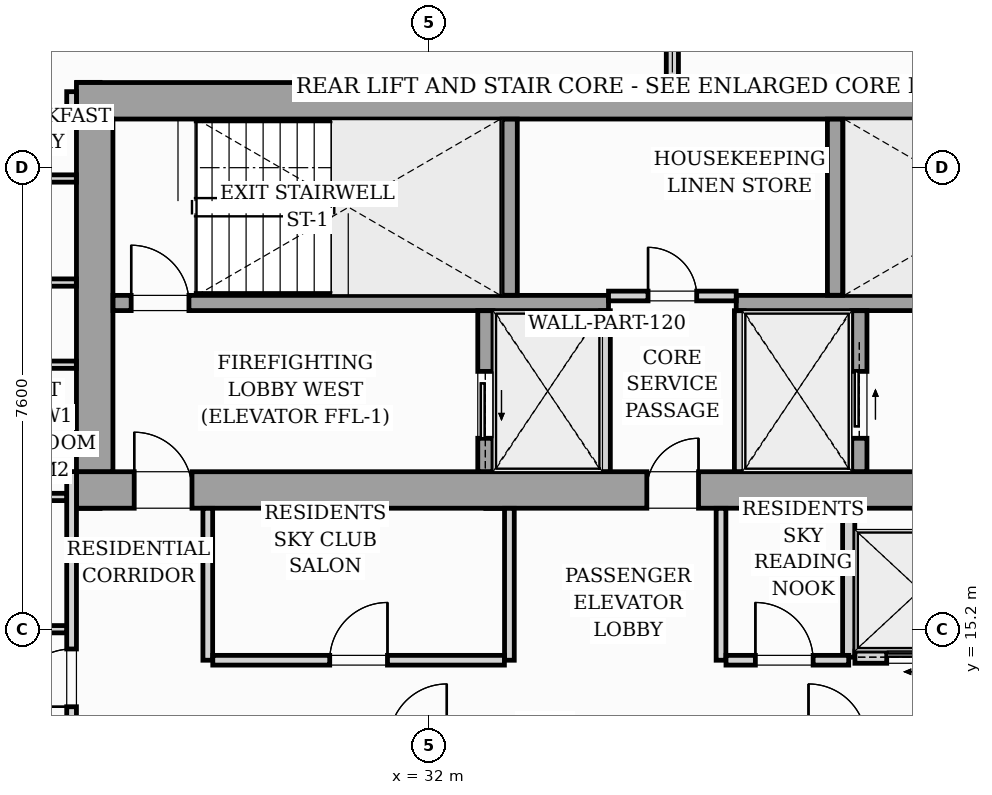
"""IFC4 building model, lengths in metres.
Left out: names, types, materials, properties, quantities, classifications, styles, units other than length and angle.
Written with IfcOpenShell. Run it as: python <this file> out.ifc"""

import sys

from ifc_helpers import new_model, si_unit, direction, frame, frame_2d, origin, origin_2d, place, context, subcontext, project, spatial, rectangle, i_section, extrude, source, transform, mapped, element, fill, save


model = new_model("IFC4")
c1 = context("Model", 3, precision=1e-05, world=origin(), true_north=direction((0.0, 1.0)))
c2 = subcontext(c1, "Body", "Model", "MODEL_VIEW")
j1 = project(units=[si_unit("LENGTHUNIT", "METRE"), si_unit("PLANEANGLEUNIT", "RADIAN")], contexts=[c1])
p1 = place(None, origin())
s1 = spatial("IfcSite", under=j1, at=p1, CompositionType="ELEMENT")
p2 = place(p1, origin())
s2 = spatial("IfcBuilding", under=s1, at=p2, CompositionType="ELEMENT")
p3 = place(p2, frame((0.0, 0.0, 201.8)))
s3 = spatial("IfcBuildingStorey", under=s2, at=p3, CompositionType="ELEMENT", Elevation=201.8)
m1 = source(origin(), c2, "Body", "SweptSolid", [
    extrude(i_section(OverallWidth=0.416, OverallDepth=0.446, WebThickness=0.039, FlangeThickness=0.063, FilletRadius=0.018, at=origin_2d()), origin(), (0.0, 0.0, 1.0), 3.196),
])
for number, where, z_axis, x_axis in (
    (1, (26.4, 17.4, 0.002), (0.0, 0.0, 1.0), (1.0, 0.0, 0.0)),
    (2, (33.12, 17.4, 0.002), (0.0, 0.0, 1.0), (1.0, 0.0, 0.0)),
    (3, (38.88, 17.4, 0.002), (0.0, 0.0, 1.0), (1.0, 0.0, 0.0)),
    (4, (26.4, 24.0, 0.002), (0.0, 0.0, 1.0), (1.0, 0.0, 0.0)),
    (5, (33.12, 24.0, 0.002), (0.0, 0.0, 1.0), (1.0, 0.0, 0.0)),
    (6, (38.88, 24.0, 0.002), (0.0, 0.0, 1.0), (1.0, 0.0, 0.0)),
):
    element("IfcColumn", number, at=place(p3, frame(where, z_axis=z_axis, x_axis=x_axis)), inside=s3, PredefinedType="PILASTER", context=c2, shape_type="MappedRepresentation", body=[
        mapped(m1, transform((0.0, 0.0, 0.0), scale=1.0)),
    ])
p4 = place(p3, frame((15.437, 24.324, 0.0), z_axis=(0.0, 0.0, 1.0), x_axis=(0.995395627913, 0.095851676732, 0.0)))
e7 = element("IfcWall", 7, at=p4, inside=s3, PredefinedType="STANDARD", context=c2, shape_type="SweptSolid", body=[
    extrude(rectangle(XDim=16.1, YDim=0.26, at=frame_2d((8.05, 0.0))), origin(), (0.0, 0.0, 1.0), 2.94),
])
p5 = place(p4, frame((6.09, 0.0, 0.0)))
e8 = element("IfcOpeningElement", 8, at=p5, cuts=e7, PredefinedType="OPENING", context=c2, shape_type="SweptSolid", body=[
    extrude(rectangle(XDim=1.8, YDim=2.06, at=frame_2d((0.9, 1.03))), frame((0.0, 0.14, 0.0), z_axis=(0.0, -1.0, 0.0), x_axis=(1.0, 0.0, 0.0)), (0.0, 0.0, 1.0), 0.28),
])
p6 = place(p4, frame((2.05, 0.0, 0.65)))
e9 = element("IfcOpeningElement", 9, at=p6, cuts=e7, PredefinedType="OPENING", context=c2, shape_type="SweptSolid", body=[
    extrude(rectangle(XDim=1.6, YDim=1.5, at=frame_2d((0.8, 0.75))), frame((0.0, 0.14, 0.0), z_axis=(0.0, -1.0, 0.0), x_axis=(1.0, 0.0, 0.0)), (0.0, 0.0, 1.0), 0.28),
])
p7 = place(p3, frame((26.2, 17.5, 0.0), z_axis=(0.0, 0.0, 1.0), x_axis=(1.0, 0.0, 0.0)))
e10 = element("IfcWall", 10, at=p7, inside=s3, PredefinedType="SHEAR", context=c2, shape_type="SweptSolid", body=[
    extrude(rectangle(XDim=19.6, YDim=0.6, at=frame_2d((9.8, 0.0))), origin(), (0.0, 0.0, 1.0), 3.2),
])
p8 = place(p7, frame((0.95, 0.0, 0.0)))
e11 = element("IfcOpeningElement", 11, at=p8, cuts=e10, PredefinedType="OPENING", context=c2, shape_type="SweptSolid", body=[
    extrude(rectangle(XDim=0.95, YDim=2.06, at=frame_2d((0.475, 1.03))), frame((0.0, 0.31, 0.0), z_axis=(0.0, -1.0, 0.0), x_axis=(1.0, 0.0, 0.0)), (0.0, 0.0, 1.0), 0.62),
])
p9 = place(p7, frame((9.38, 0.0, 0.0)))
e12 = element("IfcOpeningElement", 12, at=p9, cuts=e10, PredefinedType="OPENING", context=c2, shape_type="SweptSolid", body=[
    extrude(rectangle(XDim=0.85, YDim=2.0, at=frame_2d((0.425, 1.0))), frame((0.0, 0.31, 0.0), z_axis=(0.0, -1.0, 0.0), x_axis=(1.0, 0.0, 0.0)), (0.0, 0.0, 1.0), 0.62),
])
p10 = place(p7, frame((17.55, 0.0, 0.0)))
e13 = element("IfcOpeningElement", 13, at=p10, cuts=e10, PredefinedType="OPENING", context=c2, shape_type="SweptSolid", body=[
    extrude(rectangle(XDim=0.95, YDim=2.06, at=frame_2d((0.475, 1.03))), frame((0.0, 0.31, 0.0), z_axis=(0.0, -1.0, 0.0), x_axis=(1.0, 0.0, 0.0)), (0.0, 0.0, 1.0), 0.62),
])
p11 = place(p3, frame((26.2, 23.9, 0.0), z_axis=(0.0, 0.0, 1.0), x_axis=(1.0, 0.0, 0.0)))
e14 = element("IfcWall", 14, at=p11, inside=s3, PredefinedType="SHEAR", context=c2, shape_type="SweptSolid", body=[
    extrude(rectangle(XDim=19.6, YDim=0.6, at=frame_2d((9.8, 0.0))), origin(), (0.0, 0.0, 1.0), 3.2),
])
p12 = place(p3, frame((26.5, 17.802, 0.0), z_axis=(0.0, 0.0, 1.0), x_axis=(0.0, 1.0, 0.0)))
e15 = element("IfcWall", 15, at=p12, inside=s3, PredefinedType="SHEAR", context=c2, shape_type="SweptSolid", body=[
    extrude(rectangle(XDim=5.796, YDim=0.6, at=frame_2d((2.898, 0.0))), origin(), (0.0, 0.0, 1.0), 3.2),
])
p13 = place(p3, frame((26.802, 20.575, 0.0), z_axis=(0.0, 0.0, 1.0), x_axis=(1.0, 0.0, 0.0)))
e16 = element("IfcWall", 16, at=p13, inside=s3, PredefinedType="SOLIDWALL", context=c2, shape_type="SweptSolid", body=[
    extrude(rectangle(XDim=8.148, YDim=0.25, at=frame_2d((4.074, 0.0))), origin(), (0.0, 0.0, 1.0), 3.2),
])
p14 = place(p13, frame((0.298, 0.0, 0.0)))
e17 = element("IfcOpeningElement", 17, at=p14, cuts=e16, PredefinedType="OPENING", context=c2, shape_type="SweptSolid", body=[
    extrude(rectangle(XDim=0.95, YDim=2.06, at=frame_2d((0.475, 1.03))), frame((0.0, 0.135, 0.0), z_axis=(0.0, -1.0, 0.0), x_axis=(1.0, 0.0, 0.0)), (0.0, 0.0, 1.0), 0.27),
])
p15 = place(p3, frame((37.05, 20.575, 0.0), z_axis=(0.0, 0.0, 1.0), x_axis=(1.0, 0.0, 0.0)))
e18 = element("IfcWall", 18, at=p15, inside=s3, PredefinedType="SOLIDWALL", context=c2, shape_type="SweptSolid", body=[
    extrude(rectangle(XDim=8.148, YDim=0.25, at=frame_2d((4.074, 0.0))), origin(), (0.0, 0.0, 1.0), 3.2),
])
p16 = place(p15, frame((6.6, 0.0, 0.0)))
e19 = element("IfcOpeningElement", 19, at=p16, cuts=e18, PredefinedType="OPENING", context=c2, shape_type="SweptSolid", body=[
    extrude(rectangle(XDim=0.95, YDim=2.06, at=frame_2d((0.475, 1.03))), frame((0.0, 0.135, 0.0), z_axis=(0.0, -1.0, 0.0), x_axis=(1.0, 0.0, 0.0)), (0.0, 0.0, 1.0), 0.27),
])
for number, where, z_axis, x_axis in (
    (20, (33.325, 20.702, 0.0), (0.0, 0.0, 1.0), (0.0, 1.0, 0.0)),
    (21, (38.675, 20.702, 0.0), (0.0, 0.0, 1.0), (0.0, 1.0, 0.0)),
):
    element("IfcWall", number, at=place(p3, frame(where, z_axis=z_axis, x_axis=x_axis)), inside=s3, PredefinedType="SOLIDWALL", context=c2, shape_type="SweptSolid", body=[
        extrude(rectangle(XDim=2.896, YDim=0.25, at=frame_2d((1.448, 0.0))), origin(), (0.0, 0.0, 1.0), 3.2),
    ])
p17 = place(p3, frame((32.925, 17.802, 0.0), z_axis=(0.0, 0.0, 1.0), x_axis=(0.0, 1.0, 0.0)))
e22 = element("IfcWall", 22, at=p17, inside=s3, PredefinedType="SOLIDWALL", context=c2, shape_type="SweptSolid", body=[
    extrude(rectangle(XDim=2.646, YDim=0.25, at=frame_2d((1.323, 0.0))), origin(), (0.0, 0.0, 1.0), 3.2),
])
p18 = place(p17, frame((0.548, 0.0, 0.0)))
e23 = element("IfcOpeningElement", 23, at=p18, cuts=e22, PredefinedType="OPENING", context=c2, shape_type="SweptSolid", body=[
    extrude(rectangle(XDim=1.1, YDim=2.08, at=frame_2d((0.55, 1.04))), frame((0.0, 0.135, 0.0), z_axis=(0.0, -1.0, 0.0), x_axis=(1.0, 0.0, 0.0)), (0.0, 0.0, 1.0), 0.27),
])
for number, where, z_axis, x_axis in (
    (24, (34.9, 17.802, 0.0), (0.0, 0.0, 1.0), (0.0, 1.0, 0.0)),
    (25, (37.1, 17.802, 0.0), (0.0, 0.0, 1.0), (0.0, 1.0, 0.0)),
):
    element("IfcWall", number, at=place(p3, frame(where, z_axis=z_axis, x_axis=x_axis)), inside=s3, PredefinedType="PARTITIONING", context=c2, shape_type="SweptSolid", body=[
        extrude(rectangle(XDim=2.646, YDim=0.16, at=frame_2d((1.323, 0.0))), origin(), (0.0, 0.0, 1.0), 2.94),
    ])
p19 = place(p3, frame((39.075, 17.802, 0.0), z_axis=(0.0, 0.0, 1.0), x_axis=(0.0, 1.0, 0.0)))
e26 = element("IfcWall", 26, at=p19, inside=s3, PredefinedType="SOLIDWALL", context=c2, shape_type="SweptSolid", body=[
    extrude(rectangle(XDim=2.646, YDim=0.25, at=frame_2d((1.323, 0.0))), origin(), (0.0, 0.0, 1.0), 3.2),
])
p20 = place(p19, frame((0.548, 0.0, 0.0)))
e27 = element("IfcOpeningElement", 27, at=p20, cuts=e26, PredefinedType="OPENING", context=c2, shape_type="SweptSolid", body=[
    extrude(rectangle(XDim=1.1, YDim=2.08, at=frame_2d((0.55, 1.04))), frame((0.0, 0.135, 0.0), z_axis=(0.0, -1.0, 0.0), x_axis=(1.0, 0.0, 0.0)), (0.0, 0.0, 1.0), 0.27),
])
p21 = place(p3, frame((34.95, 20.69, 0.0), z_axis=(0.0, 0.0, 1.0), x_axis=(1.0, 0.0, 0.0)))
e28 = element("IfcWall", 28, at=p21, inside=s3, PredefinedType="PARTITIONING", context=c2, shape_type="SweptSolid", body=[
    extrude(rectangle(XDim=2.1, YDim=0.16, at=frame_2d((1.05, 0.0))), origin(), (0.0, 0.0, 1.0), 2.94),
])
p22 = place(p21, frame((0.65, 0.0, 0.0)))
e29 = element("IfcOpeningElement", 29, at=p22, cuts=e28, PredefinedType="OPENING", context=c2, shape_type="SweptSolid", body=[
    extrude(rectangle(XDim=0.8, YDim=2.05, at=frame_2d((0.4, 1.025))), frame((0.0, 0.09, 0.0), z_axis=(0.0, -1.0, 0.0), x_axis=(1.0, 0.0, 0.0)), (0.0, 0.0, 1.0), 0.18),
])
p23 = place(p3, frame((38.9, 14.75, 0.0), z_axis=(0.0, 0.0, 1.0), x_axis=(0.0, 1.0, 0.0)))
e30 = element("IfcWall", 30, at=p23, inside=s3, PredefinedType="PARTITIONING", context=c2, shape_type="SweptSolid", body=[
    extrude(rectangle(XDim=2.35, YDim=0.2, at=frame_2d((1.175, 0.0))), origin(), (0.0, 0.0, 1.0), 2.94),
])
p24 = place(p3, frame((39.002, 14.75, 0.0), z_axis=(0.0, 0.0, 1.0), x_axis=(1.0, 0.0, 0.0)))
e31 = element("IfcWall", 31, at=p24, inside=s3, PredefinedType="PARTITIONING", context=c2, shape_type="SweptSolid", body=[
    extrude(rectangle(XDim=2.146, YDim=0.2, at=frame_2d((1.073, 0.0))), origin(), (0.0, 0.0, 1.0), 2.94),
])
p25 = place(p24, frame((0.523, 0.0, 0.0)))
e32 = element("IfcOpeningElement", 32, at=p25, cuts=e31, PredefinedType="OPENING", context=c2, shape_type="SweptSolid", body=[
    extrude(rectangle(XDim=1.05, YDim=2.08, at=frame_2d((0.525, 1.04))), frame((0.0, 0.11, 0.0), z_axis=(0.0, -1.0, 0.0), x_axis=(1.0, 0.0, 0.0)), (0.0, 0.0, 1.0), 0.22),
])
p26 = place(p3, frame((26.12, 13.442, 0.0), z_axis=(0.0, 0.0, 1.0), x_axis=(0.0, 1.0, 0.0)))
e33 = element("IfcWall", 33, at=p26, inside=s3, PredefinedType="PARTITIONING", context=c2, shape_type="SweptSolid", body=[
    extrude(rectangle(XDim=4.36, YDim=0.16, at=frame_2d((2.18, 0.0))), origin(), (0.0, 0.0, 1.0), 2.94),
])
p27 = place(p26, frame((0.493, 0.0, 0.0)))
e34 = element("IfcOpeningElement", 34, at=p27, cuts=e33, PredefinedType="OPENING", context=c2, shape_type="SweptSolid", body=[
    extrude(rectangle(XDim=0.95, YDim=2.06, at=frame_2d((0.475, 1.03))), frame((0.0, 0.09, 0.0), z_axis=(0.0, -1.0, 0.0), x_axis=(1.0, 0.0, 0.0)), (0.0, 0.0, 1.0), 0.18),
])
p28 = place(p3, frame((26.12, 23.598, 0.0), z_axis=(0.0, 0.0, 1.0), x_axis=(0.0, 1.0, 0.0)))
e35 = element("IfcWall", 35, at=p28, inside=s3, PredefinedType="PARTITIONING", context=c2, shape_type="SweptSolid", body=[
    extrude(rectangle(XDim=0.452, YDim=0.16, at=frame_2d((0.226, 0.0))), origin(), (0.0, 0.0, 1.0), 2.94),
])
p29 = place(p3, frame((36.0, 24.202, 0.0), z_axis=(0.0, 0.0, 1.0), x_axis=(0.0, 1.0, 0.0)))
e36 = element("IfcWall", 36, at=p29, inside=s3, PredefinedType="PARTITIONING", context=c2, shape_type="SweptSolid", body=[
    extrude(rectangle(XDim=2.152, YDim=0.2, at=frame_2d((1.076, 0.0))), origin(), (0.0, 0.0, 1.0), 2.94),
])
p30 = place(p3, frame((23.782, 17.385, 0.0), z_axis=(0.0, 0.0, 1.0), x_axis=(1.0, 0.0, 0.0)))
e37 = element("IfcWall", 37, at=p30, inside=s3, PredefinedType="PARTITIONING", context=c2, shape_type="SweptSolid", body=[
    extrude(rectangle(XDim=2.256, YDim=0.12, at=frame_2d((1.128, 0.0))), origin(), (0.0, 0.0, 1.0), 2.281),
])
p31 = place(p3, frame((23.782, 15.21, 0.0), z_axis=(0.0, 0.0, 1.0), x_axis=(1.0, 0.0, 0.0)))
e38 = element("IfcWall", 38, at=p31, inside=s3, PredefinedType="PARTITIONING", context=c2, shape_type="SweptSolid", body=[
    extrude(rectangle(XDim=2.256, YDim=0.12, at=frame_2d((1.128, 0.0))), origin(), (0.0, 0.0, 1.0), 2.94),
])
p32 = place(p3, frame((23.782, 19.56, 0.0), z_axis=(0.0, 0.0, 1.0), x_axis=(1.0, 0.0, 0.0)))
e39 = element("IfcWall", 39, at=p32, inside=s3, PredefinedType="PARTITIONING", context=c2, shape_type="SweptSolid", body=[
    extrude(rectangle(XDim=2.416, YDim=0.12, at=frame_2d((1.208, 0.0))), origin(), (0.0, 0.0, 1.0), 2.94),
])
p33 = place(p3, frame((14.608, 22.622, 0.0), z_axis=(0.0, 0.0, 1.0), x_axis=(1.0, 0.0, 0.0)))
e40 = element("IfcWall", 40, at=p33, inside=s3, PredefinedType="PARTITIONING", context=c2, shape_type="SweptSolid", body=[
    extrude(rectangle(XDim=11.59, YDim=0.12, at=frame_2d((5.795, 0.0))), origin(), (0.0, 0.0, 1.0), 2.94),
])
p34 = place(p33, frame((5.27, 0.0, 0.0)))
e41 = element("IfcOpeningElement", 41, at=p34, cuts=e40, PredefinedType="OPENING", context=c2, shape_type="SweptSolid", body=[
    extrude(rectangle(XDim=0.85, YDim=2.05, at=frame_2d((0.425, 1.025))), frame((0.0, 0.07, 0.0), z_axis=(0.0, -1.0, 0.0), x_axis=(1.0, 0.0, 0.0)), (0.0, 0.0, 1.0), 0.14),
])
p35 = place(p3, frame((13.334, 20.911, 0.0), z_axis=(0.0, 0.0, 1.0), x_axis=(1.0, 0.0, 0.0)))
e42 = element("IfcWall", 42, at=p35, inside=s3, PredefinedType="PARTITIONING", context=c2, shape_type="SweptSolid", body=[
    extrude(rectangle(XDim=12.864, YDim=0.12, at=frame_2d((6.432, 0.0))), origin(), (0.0, 0.0, 1.0), 2.94),
])
p36 = place(p35, frame((5.881, 0.0, 0.0)))
e43 = element("IfcOpeningElement", 43, at=p36, cuts=e42, PredefinedType="OPENING", context=c2, shape_type="SweptSolid", body=[
    extrude(rectangle(XDim=0.85, YDim=2.05, at=frame_2d((0.425, 1.025))), frame((0.0, 0.07, 0.0), z_axis=(0.0, -1.0, 0.0), x_axis=(1.0, 0.0, 0.0)), (0.0, 0.0, 1.0), 0.14),
])
for number, where, z_axis, x_axis in (
    (44, (28.36, 14.7, 0.0), (0.0, 0.0, 1.0), (0.0, 1.0, 0.0)),
    (45, (33.32, 14.7, 0.0), (0.0, 0.0, 1.0), (0.0, 1.0, 0.0)),
):
    element("IfcWall", number, at=place(p3, frame(where, z_axis=z_axis, x_axis=x_axis)), inside=s3, PredefinedType="PARTITIONING", context=c2, shape_type="SweptSolid", body=[
        extrude(rectangle(XDim=2.498, YDim=0.16, at=frame_2d((1.249, 0.0))), origin(), (0.0, 0.0, 1.0), 2.94),
    ])
p37 = place(p3, frame((28.442, 14.7, 0.0), z_axis=(0.0, 0.0, 1.0), x_axis=(1.0, 0.0, 0.0)))
e46 = element("IfcWall", 46, at=p37, inside=s3, PredefinedType="PARTITIONING", context=c2, shape_type="SweptSolid", body=[
    extrude(rectangle(XDim=4.796, YDim=0.16, at=frame_2d((2.398, 0.0))), origin(), (0.0, 0.0, 1.0), 2.94),
])
p38 = place(p37, frame((1.923, 0.0, 0.0)))
e47 = element("IfcOpeningElement", 47, at=p38, cuts=e46, PredefinedType="OPENING", context=c2, shape_type="SweptSolid", body=[
    extrude(rectangle(XDim=0.95, YDim=2.06, at=frame_2d((0.475, 1.03))), frame((0.0, 0.09, 0.0), z_axis=(0.0, -1.0, 0.0), x_axis=(1.0, 0.0, 0.0)), (0.0, 0.0, 1.0), 0.18),
])
p39 = place(p3, frame((36.8, 14.7, 0.0), z_axis=(0.0, 0.0, 1.0), x_axis=(0.0, 1.0, 0.0)))
e48 = element("IfcWall", 48, at=p39, inside=s3, PredefinedType="PARTITIONING", context=c2, shape_type="SweptSolid", body=[
    extrude(rectangle(XDim=2.498, YDim=0.16, at=frame_2d((1.249, 0.0))), origin(), (0.0, 0.0, 1.0), 2.94),
])
p40 = place(p3, frame((36.882, 14.7, 0.0), z_axis=(0.0, 0.0, 1.0), x_axis=(1.0, 0.0, 0.0)))
e49 = element("IfcWall", 49, at=p40, inside=s3, PredefinedType="PARTITIONING", context=c2, shape_type="SweptSolid", body=[
    extrude(rectangle(XDim=2.018, YDim=0.16, at=frame_2d((1.009, 0.0))), origin(), (0.0, 0.0, 1.0), 2.94),
])
p41 = place(p40, frame((0.483, 0.0, 0.0)))
e50 = element("IfcOpeningElement", 50, at=p41, cuts=e49, PredefinedType="OPENING", context=c2, shape_type="SweptSolid", body=[
    extrude(rectangle(XDim=0.95, YDim=2.06, at=frame_2d((0.475, 1.03))), frame((0.0, 0.09, 0.0), z_axis=(0.0, -1.0, 0.0), x_axis=(1.0, 0.0, 0.0)), (0.0, 0.0, 1.0), 0.18),
])
m2 = source(origin(), c2, "Body", "SweptSolid", [
    extrude(rectangle(XDim=0.95, YDim=2.06, at=frame_2d((0.475, 1.03))), frame((0.0, 0.025, 0.0), z_axis=(0.0, -1.0, 0.0), x_axis=(1.0, 0.0, 0.0)), (0.0, 0.0, 1.0), 0.05),
])
p42 = place(p8, origin())
e51 = element("IfcDoor", 51, at=p42, inside=s3, OperationType="SINGLE_SWING_LEFT", PredefinedType="DOOR", context=c2, shape_type="MappedRepresentation", body=[
    mapped(m2, transform((0.0, 0.0, 0.0), scale=1.0)),
])
fill(e11, e51)
m3 = source(origin(), c2, "Body", "SweptSolid", [
    extrude(rectangle(XDim=0.85, YDim=2.0, at=frame_2d((0.425, 1.0))), frame((0.0, 0.025, 0.0), z_axis=(0.0, -1.0, 0.0), x_axis=(1.0, 0.0, 0.0)), (0.0, 0.0, 1.0), 0.05),
])
p43 = place(p9, origin())
e52 = element("IfcDoor", 52, at=p43, inside=s3, OperationType="SINGLE_SWING_RIGHT", PredefinedType="DOOR", context=c2, shape_type="MappedRepresentation", body=[
    mapped(m3, transform((0.0, 0.0, 0.0), scale=1.0)),
])
fill(e12, e52)
p44 = place(p14, origin())
e53 = element("IfcDoor", 53, at=p44, inside=s3, OperationType="SINGLE_SWING_LEFT", PredefinedType="DOOR", context=c2, shape_type="MappedRepresentation", body=[
    mapped(m2, transform((0.0, 0.0, 0.0), scale=1.0)),
])
fill(e17, e53)
m4 = source(origin(), c2, "Body", "SweptSolid", [
    extrude(rectangle(XDim=1.1, YDim=2.08, at=frame_2d((0.55, 1.04))), frame((0.0, 0.025, 0.0), z_axis=(0.0, -1.0, 0.0), x_axis=(1.0, 0.0, 0.0)), (0.0, 0.0, 1.0), 0.05),
])
p45 = place(p18, origin())
e54 = element("IfcDoor", 54, at=p45, inside=s3, OperationType="SLIDING_TO_LEFT", PredefinedType="DOOR", context=c2, shape_type="MappedRepresentation", body=[
    mapped(m4, transform((0.0, 0.0, 0.0), scale=1.0)),
])
fill(e23, e54)
p46 = place(p20, origin())
e55 = element("IfcDoor", 55, at=p46, inside=s3, OperationType="SLIDING_TO_RIGHT", PredefinedType="DOOR", context=c2, shape_type="MappedRepresentation", body=[
    mapped(m4, transform((0.0, 0.0, 0.0), scale=1.0)),
])
fill(e27, e55)
m5 = source(origin(), c2, "Body", "SweptSolid", [
    extrude(rectangle(XDim=0.8, YDim=2.05, at=frame_2d((0.4, 1.025))), frame((0.0, 0.025, 0.0), z_axis=(0.0, -1.0, 0.0), x_axis=(1.0, 0.0, 0.0)), (0.0, 0.0, 1.0), 0.05),
])
p47 = place(p22, origin())
e56 = element("IfcDoor", 56, at=p47, inside=s3, OperationType="SINGLE_SWING_LEFT", PredefinedType="DOOR", context=c2, shape_type="MappedRepresentation", body=[
    mapped(m5, transform((0.0, 0.0, 0.0), scale=1.0)),
])
fill(e29, e56)
m6 = source(origin(), c2, "Body", "SweptSolid", [
    extrude(rectangle(XDim=1.05, YDim=2.08, at=frame_2d((0.525, 1.04))), frame((0.0, 0.025, 0.0), z_axis=(0.0, -1.0, 0.0), x_axis=(1.0, 0.0, 0.0)), (0.0, 0.0, 1.0), 0.05),
])
p48 = place(p25, origin())
e57 = element("IfcDoor", 57, at=p48, inside=s3, OperationType="SLIDING_TO_LEFT", PredefinedType="DOOR", context=c2, shape_type="MappedRepresentation", body=[
    mapped(m6, transform((0.0, 0.0, 0.0), scale=1.0)),
])
fill(e32, e57)
m7 = source(origin(), c2, "Body", "SweptSolid", [
    extrude(rectangle(XDim=0.95, YDim=2.06, at=frame_2d((0.475, 1.03))), frame((0.0, 0.025, 0.0), z_axis=(0.0, -1.0, 0.0), x_axis=(1.0, 0.0, 0.0)), (0.0, 0.0, 1.0), 0.05),
])
p49 = place(p27, origin())
e58 = element("IfcDoor", 58, at=p49, inside=s3, OperationType="SINGLE_SWING_LEFT", PredefinedType="DOOR", context=c2, shape_type="MappedRepresentation", body=[
    mapped(m7, transform((0.0, 0.0, 0.0), scale=1.0)),
])
fill(e34, e58)
p50 = place(p38, origin())
e59 = element("IfcDoor", 59, at=p50, inside=s3, OperationType="SINGLE_SWING_RIGHT", PredefinedType="DOOR", context=c2, shape_type="MappedRepresentation", body=[
    mapped(m7, transform((0.0, 0.0, 0.0), scale=1.0)),
])
fill(e47, e59)
p51 = place(p41, origin())
e60 = element("IfcDoor", 60, at=p51, inside=s3, OperationType="SINGLE_SWING_LEFT", PredefinedType="DOOR", context=c2, shape_type="MappedRepresentation", body=[
    mapped(m7, transform((0.0, 0.0, 0.0), scale=1.0)),
])
fill(e50, e60)
save(model, sys.argv[1])
